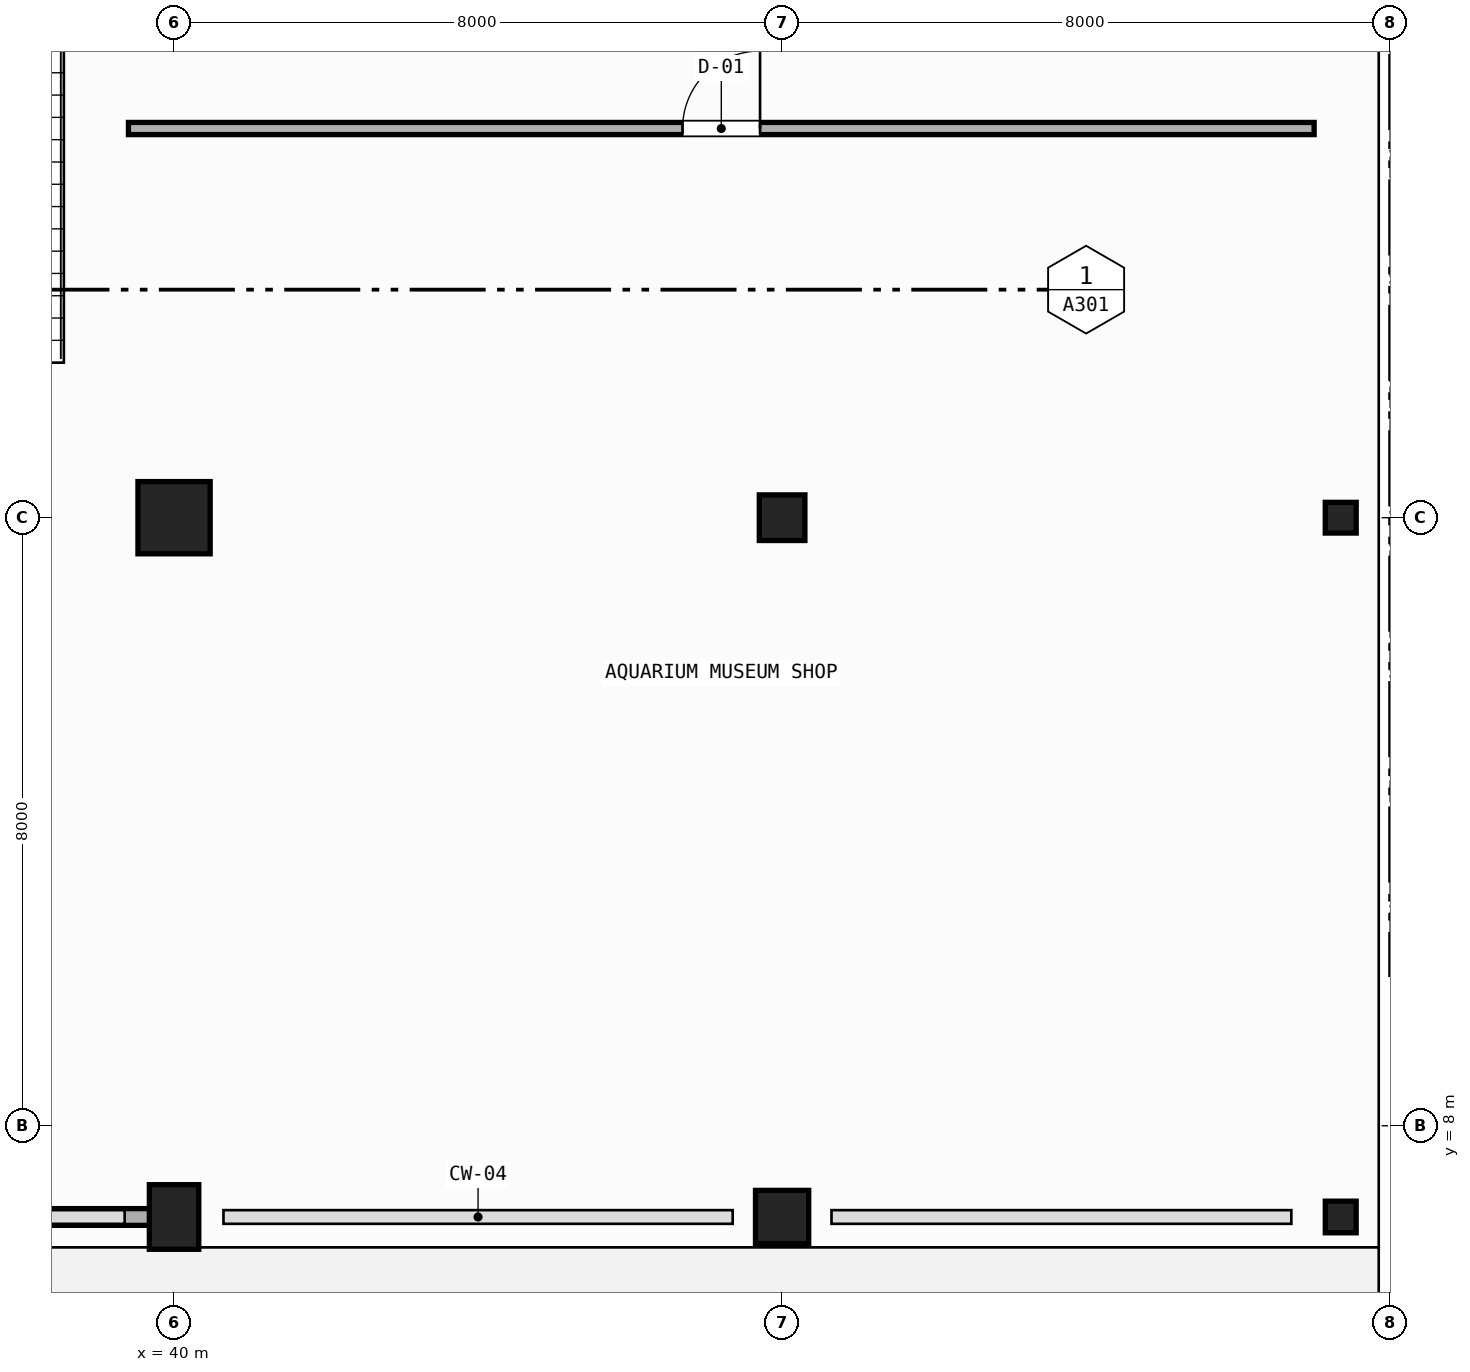
"""IFC4 building model, lengths in metres.
Left out: names, types, materials, properties, quantities, classifications, styles, units other than length and angle.
Written with IfcOpenShell. Run it as: python <this file> out.ifc"""

import sys

from ifc_helpers import new_model, si_unit, direction, frame, frame_2d, origin, origin_2d, place, context, subcontext, project, spatial, rectangle, i_section, extrude, element, fill, save


model = new_model("IFC4")
c1 = context("Model", 3, precision=1e-05, world=origin(), true_north=direction((0.0, 1.0)))
c2 = subcontext(c1, "Body", "Model", "MODEL_VIEW")
j1 = project(units=[si_unit("LENGTHUNIT", "METRE"), si_unit("PLANEANGLEUNIT", "RADIAN")], contexts=[c1])
p1 = place(None, origin())
s1 = spatial("IfcSite", under=j1, at=p1, CompositionType="ELEMENT")
p2 = place(p1, origin())
s2 = spatial("IfcBuilding", under=s1, at=p2, CompositionType="ELEMENT")
p3 = place(p2, origin())
s3 = spatial("IfcBuildingStorey", under=s2, at=p3, CompositionType="ELEMENT", Elevation=0.0)
p4 = place(p3, frame((40.0, 6.8, 0.0), z_axis=(0.0, 0.0, 1.0), x_axis=(1.0, 0.0, 0.0)))
e1 = element("IfcColumn", 1, at=p4, inside=s3, PredefinedType="PILASTER", context=c2, shape_type="SweptSolid", body=[
    extrude(rectangle(XDim=0.65, YDim=0.85, at=origin_2d()), origin(), (0.0, 0.0, 1.0), 5.4),
])
p5 = place(p3, frame((40.0, 16.0, 0.0), z_axis=(0.0, 0.0, 1.0), x_axis=(0.0, 1.0, 0.0)))
e2 = element("IfcColumn", 2, at=p5, inside=s3, PredefinedType="COLUMN", context=c2, shape_type="SweptSolid", body=[
    extrude(rectangle(XDim=0.95, YDim=0.95, at=origin_2d()), origin(), (0.0, 0.0, 1.0), 5.12),
])
p6 = place(p3, frame((48.0, 6.8, 0.0), z_axis=(0.0, 0.0, 1.0), x_axis=(0.0, 1.0, 0.0)))
e3 = element("IfcColumn", 3, at=p6, inside=s3, PredefinedType="COLUMN", context=c2, shape_type="SweptSolid", body=[
    extrude(rectangle(XDim=0.7, YDim=0.7, at=origin_2d()), origin(), (0.0, 0.0, 1.0), 5.4),
])
p7 = place(p3, frame((48.0, 16.0, 0.0), z_axis=(0.0, 0.0, 1.0), x_axis=(1.0, 0.0, 0.0)))
e4 = element("IfcColumn", 4, at=p7, inside=s3, PredefinedType="COLUMN", context=c2, shape_type="SweptSolid", body=[
    extrude(rectangle(XDim=0.6, YDim=0.6, at=origin_2d()), origin(), (0.0, 0.0, 1.0), 5.4),
])
p8 = place(p3, frame((55.35, 6.8, 0.0), z_axis=(0.0, 0.0, 1.0), x_axis=(1.0, 0.0, 0.0)))
e5 = element("IfcColumn", 5, at=p8, inside=s3, PredefinedType="COLUMN", context=c2, shape_type="SweptSolid", body=[
    extrude(i_section(OverallWidth=0.406, OverallDepth=0.416, WebThickness=0.03, FlangeThickness=0.048, FilletRadius=0.015, at=origin_2d()), origin(), (0.0, 0.0, 1.0), 5.4),
])
p9 = place(p3, frame((55.35, 16.0, 0.0), z_axis=(0.0, 0.0, 1.0), x_axis=(0.0, 1.0, 0.0)))
e6 = element("IfcColumn", 6, at=p9, inside=s3, PredefinedType="COLUMN", context=c2, shape_type="SweptSolid", body=[
    extrude(i_section(OverallWidth=0.404, OverallDepth=0.407, WebThickness=0.027, FlangeThickness=0.044, FilletRadius=0.015, at=origin_2d()), origin(), (0.0, 0.0, 1.0), 5.12),
])
p10 = place(p3, frame((39.86, 6.8, 0.0), z_axis=(0.0, 0.0, 1.0), x_axis=(-1.0, 0.0, 0.0)))
e7 = element("IfcWall", 7, at=p10, inside=s3, PredefinedType="STANDARD", context=c2, shape_type="SweptSolid", body=[
    extrude(rectangle(XDim=7.72, YDim=0.22, at=frame_2d((3.86, 0.0))), origin(), (0.0, 0.0, 1.0), 4.8),
])
p11 = place(p10, frame((2.66, 0.0, 0.0)))
e8 = element("IfcOpeningElement", 8, at=p11, cuts=e7, PredefinedType="OPENING", context=c2, shape_type="SweptSolid", body=[
    extrude(rectangle(XDim=2.4, YDim=2.7, at=frame_2d((1.2, 1.35))), frame((0.0, 0.12, 0.0), z_axis=(0.0, -1.0, 0.0), x_axis=(1.0, 0.0, 0.0)), (0.0, 0.0, 1.0), 0.24),
])
p12 = place(p3, frame((39.4, 21.12, 0.0), z_axis=(0.0, 0.0, 1.0), x_axis=(1.0, 0.0, 0.0)))
e9 = element("IfcWall", 9, at=p12, inside=s3, PredefinedType="PARTITIONING", context=c2, shape_type="SweptSolid", body=[
    extrude(rectangle(XDim=15.6, YDim=0.16, at=frame_2d((7.8, 0.0))), origin(), (0.0, 0.0, 1.0), 4.29),
])
p13 = place(p12, frame((7.29, 0.0, 0.0)))
e10 = element("IfcOpeningElement", 10, at=p13, cuts=e9, PredefinedType="OPENING", context=c2, shape_type="SweptSolid", body=[
    extrude(rectangle(XDim=1.02, YDim=2.15, at=frame_2d((0.51, 1.075))), frame((0.0, 0.09, 0.0), z_axis=(0.0, -1.0, 0.0), x_axis=(1.0, 0.0, 0.0)), (0.0, 0.0, 1.0), 0.18),
])
p14 = place(p13, origin())
e11 = element("IfcDoor", 11, at=p14, inside=s3, OperationType="SINGLE_SWING_RIGHT", PredefinedType="DOOR", context=c2, shape_type="SweptSolid", body=[
    extrude(rectangle(XDim=1.02, YDim=2.15, at=frame_2d((0.51, 1.075))), frame((0.0, 0.025, 0.0), z_axis=(0.0, -1.0, 0.0), x_axis=(1.0, 0.0, 0.0)), (0.0, 0.0, 1.0), 0.05),
])
fill(e10, e11)
save(model, sys.argv[1])
